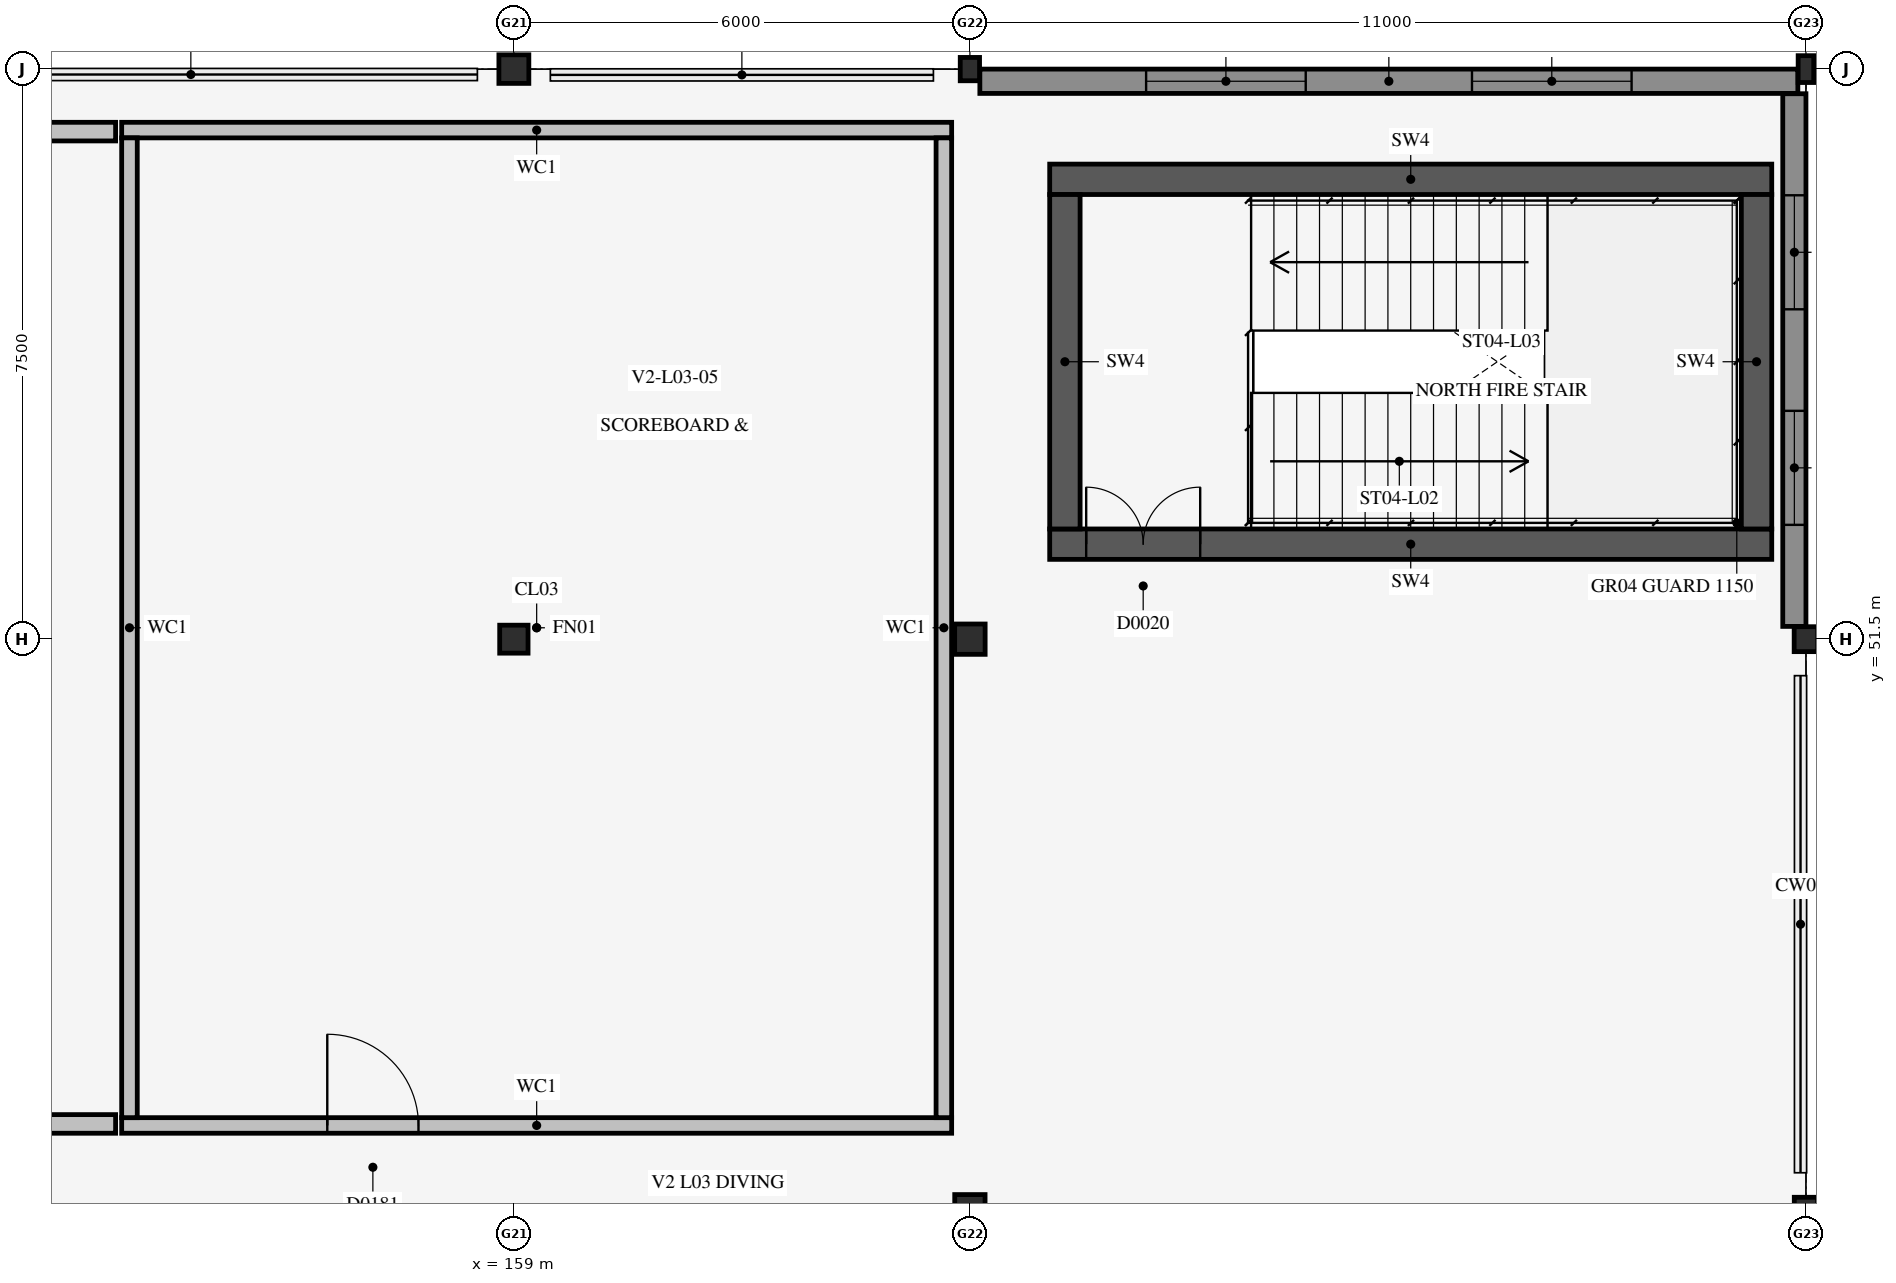
"""IFC4 building model, lengths in metres.
Left out: names, types, materials, properties, quantities, classifications, styles, units other than length and angle.
Written with IfcOpenShell. Run it as: python <this file> out.ifc"""

import sys

from ifc_helpers import new_model, si_unit, direction, frame, frame_2d, origin, origin_2d, place, context, subcontext, project, spatial, rectangle, i_section, extrude, element, fill, save


model = new_model("IFC4")
c1 = context("Model", 3, precision=1e-05, world=origin(), true_north=direction((0.0, 1.0)))
c2 = subcontext(c1, "Body", "Model", "MODEL_VIEW")
j1 = project(units=[si_unit("LENGTHUNIT", "METRE"), si_unit("PLANEANGLEUNIT", "RADIAN")], contexts=[c1])
p1 = place(None, origin())
s1 = spatial("IfcSite", under=j1, at=p1, CompositionType="ELEMENT")
p2 = place(p1, origin())
s2 = spatial("IfcBuilding", under=s1, at=p2, CompositionType="ELEMENT")
p3 = place(p2, frame((0.0, 0.0, 14.8)))
s3 = spatial("IfcBuildingStorey", under=s2, at=p3, CompositionType="ELEMENT", Elevation=14.8)
p4 = place(p3, frame((166.05, 52.75, 0.0), z_axis=(0.0, 0.0, 1.0), x_axis=(1.0, 0.0, 0.0)))
e1 = element("IfcWall", 1, at=p4, inside=s3, PredefinedType="SHEAR", context=c2, shape_type="SweptSolid", body=[
    extrude(rectangle(XDim=9.5, YDim=0.4, at=frame_2d((4.75, 0.0))), origin(), (0.0, 0.0, 1.0), 4.0),
])
p5 = place(p4, frame((0.48, 0.0, 0.0)))
e2 = element("IfcOpeningElement", 2, at=p5, cuts=e1, PredefinedType="OPENING", context=c2, shape_type="SweptSolid", body=[
    extrude(rectangle(XDim=1.5, YDim=2.3, at=frame_2d((0.75, 1.15))), frame((0.0, 0.212, 0.0), z_axis=(0.0, -1.0, 0.0), x_axis=(1.0, 0.0, 0.0)), (0.0, 0.0, 1.0), 0.424),
])
p6 = place(p3, frame((166.05, 57.55, 0.0), z_axis=(0.0, 0.0, 1.0), x_axis=(1.0, 0.0, 0.0)))
e3 = element("IfcWall", 3, at=p6, inside=s3, PredefinedType="SHEAR", context=c2, shape_type="SweptSolid", body=[
    extrude(rectangle(XDim=9.5, YDim=0.4, at=frame_2d((4.75, 0.0))), origin(), (0.0, 0.0, 1.0), 4.0),
])
for number, where, z_axis, x_axis in (
    (4, (166.25, 52.95, 0.0), (0.0, 0.0, 1.0), (0.0, 1.0, 0.0)),
    (5, (175.35, 52.95, 0.0), (0.0, 0.0, 1.0), (0.0, 1.0, 0.0)),
):
    element("IfcWall", number, at=place(p3, frame(where, z_axis=z_axis, x_axis=x_axis)), inside=s3, PredefinedType="SHEAR", context=c2, shape_type="SweptSolid", body=[
        extrude(rectangle(XDim=4.4, YDim=0.4, at=frame_2d((2.2, 0.0))), origin(), (0.0, 0.0, 1.0), 4.0),
    ])
p7 = place(p3, frame((159.0, 51.5, 0.0), z_axis=(0.0, 0.0, 1.0), x_axis=(1.0, 0.0, 0.0)))
e6 = element("IfcColumn", 6, at=p7, inside=s3, PredefinedType="COLUMN", context=c2, shape_type="SweptSolid", body=[
    extrude(i_section(OverallWidth=0.373, OverallDepth=0.368, WebThickness=0.015, FlangeThickness=0.024, FilletRadius=0.014, at=origin_2d()), origin(), (0.0, 0.0, 1.0), 4.82),
])
p8 = place(p3, frame((159.0, 59.0, 0.0), z_axis=(0.0, 0.0, 1.0), x_axis=(1.0, 0.0, 0.0)))
e7 = element("IfcColumn", 7, at=p8, inside=s3, PredefinedType="COLUMN", context=c2, shape_type="SweptSolid", body=[
    extrude(i_section(OverallWidth=0.394, OverallDepth=0.376, WebThickness=0.017, FlangeThickness=0.028, FilletRadius=0.014, at=origin_2d()), origin(), (0.0, 0.0, 1.0), 4.82),
])
p9 = place(p3, frame((165.0, 44.0, 0.0), z_axis=(0.0, 0.0, 1.0), x_axis=(1.0, 0.0, 0.0)))
e8 = element("IfcColumn", 8, at=p9, inside=s3, PredefinedType="COLUMN", context=c2, shape_type="SweptSolid", body=[
    extrude(i_section(OverallWidth=0.399, OverallDepth=0.386, WebThickness=0.021, FlangeThickness=0.033, FilletRadius=0.014, at=origin_2d()), origin(), (0.0, 0.0, 1.0), 4.82),
])
p10 = place(p3, frame((165.0, 51.5, 0.0), z_axis=(0.0, 0.0, 1.0), x_axis=(1.0, 0.0, 0.0)))
e9 = element("IfcColumn", 9, at=p10, inside=s3, PredefinedType="COLUMN", context=c2, shape_type="SweptSolid", body=[
    extrude(i_section(OverallWidth=0.401, OverallDepth=0.399, WebThickness=0.025, FlangeThickness=0.04, FilletRadius=0.014, at=origin_2d()), origin(), (0.0, 0.0, 1.0), 4.82),
])
p11 = place(p3, frame((165.0, 59.0, 0.0), z_axis=(0.0, 0.0, 1.0), x_axis=(1.0, 0.0, 0.0)))
e10 = element("IfcColumn", 10, at=p11, inside=s3, PredefinedType="COLUMN", context=c2, shape_type="SweptSolid", body=[
    extrude(i_section(OverallWidth=0.254, OverallDepth=0.307, WebThickness=0.009, FlangeThickness=0.015, FilletRadius=0.014, at=origin_2d()), origin(), (0.0, 0.0, 1.0), 4.82),
])
p12 = place(p3, frame((176.0, 44.0, 0.0), z_axis=(0.0, 0.0, 1.0), x_axis=(1.0, 0.0, 0.0)))
e11 = element("IfcColumn", 11, at=p12, inside=s3, PredefinedType="COLUMN", context=c2, shape_type="SweptSolid", body=[
    extrude(i_section(OverallWidth=0.307, OverallDepth=0.315, WebThickness=0.012, FlangeThickness=0.019, FilletRadius=0.014, at=origin_2d()), origin(), (0.0, 0.0, 1.0), 4.82),
])
p13 = place(p3, frame((176.0, 51.5, 0.0), z_axis=(0.0, 0.0, 1.0), x_axis=(1.0, 0.0, 0.0)))
e12 = element("IfcColumn", 12, at=p13, inside=s3, PredefinedType="COLUMN", context=c2, shape_type="SweptSolid", body=[
    extrude(i_section(OverallWidth=0.31, OverallDepth=0.328, WebThickness=0.015, FlangeThickness=0.025, FilletRadius=0.014, at=origin_2d()), origin(), (0.0, 0.0, 1.0), 4.82),
])
p14 = place(p3, frame((176.0, 59.0, 0.0), z_axis=(0.0, 0.0, 1.0), x_axis=(1.0, 0.0, 0.0)))
e13 = element("IfcColumn", 13, at=p14, inside=s3, PredefinedType="COLUMN", context=c2, shape_type="SweptSolid", body=[
    extrude(i_section(OverallWidth=0.205, OverallDepth=0.353, WebThickness=0.009, FlangeThickness=0.017, FilletRadius=0.014, at=origin_2d()), origin(), (0.0, 0.0, 1.0), 4.82),
])
p15 = place(p3, frame((142.84, 45.123, 0.0), z_axis=(0.0, 0.0, 1.0), x_axis=(1.0, 0.0, 0.0)))
e14 = element("IfcWall", 14, at=p15, inside=s3, PredefinedType="SOLIDWALL", context=c2, shape_type="SweptSolid", body=[
    extrude(rectangle(XDim=10.92, YDim=0.245, at=frame_2d((5.46, 0.0))), origin(), (0.0, 0.0, 1.0), 3.785),
])
p16 = place(p15, frame((5.522, 0.0, 0.0)))
e15 = element("IfcOpeningElement", 15, at=p16, cuts=e14, PredefinedType="OPENING", context=c2, shape_type="SweptSolid", body=[
    extrude(rectangle(XDim=1.8, YDim=2.35, at=frame_2d((0.9, 1.175))), frame((0.0, 0.135, 0.0), z_axis=(0.0, -1.0, 0.0), x_axis=(1.0, 0.0, 0.0)), (0.0, 0.0, 1.0), 0.269),
])
p17 = place(p3, frame((142.84, 58.177, 0.0), z_axis=(0.0, 0.0, 1.0), x_axis=(1.0, 0.0, 0.0)))
e16 = element("IfcWall", 16, at=p17, inside=s3, PredefinedType="SOLIDWALL", context=c2, shape_type="SweptSolid", body=[
    extrude(rectangle(XDim=10.92, YDim=0.245, at=frame_2d((5.46, 0.0))), origin(), (0.0, 0.0, 1.0), 3.785),
])
p18 = place(p3, frame((153.84, 45.103, 0.0), z_axis=(0.0, 0.0, 1.0), x_axis=(1.0, 0.0, 0.0)))
e17 = element("IfcWall", 17, at=p18, inside=s3, PredefinedType="SOLIDWALL", context=c2, shape_type="SweptSolid", body=[
    extrude(rectangle(XDim=10.92, YDim=0.205, at=frame_2d((5.46, 0.0))), origin(), (0.0, 0.0, 1.0), 3.785),
])
p19 = place(p18, frame((2.705, 0.0, 0.0)))
e18 = element("IfcOpeningElement", 18, at=p19, cuts=e17, PredefinedType="OPENING", context=c2, shape_type="SweptSolid", body=[
    extrude(rectangle(XDim=1.2, YDim=2.2, at=frame_2d((0.6, 1.1))), frame((0.0, 0.115, 0.0), z_axis=(0.0, -1.0, 0.0), x_axis=(1.0, 0.0, 0.0)), (0.0, 0.0, 1.0), 0.229),
])
p20 = place(p3, frame((153.84, 58.198, 0.0), z_axis=(0.0, 0.0, 1.0), x_axis=(1.0, 0.0, 0.0)))
e19 = element("IfcWall", 19, at=p20, inside=s3, PredefinedType="SOLIDWALL", context=c2, shape_type="SweptSolid", body=[
    extrude(rectangle(XDim=10.92, YDim=0.205, at=frame_2d((5.46, 0.0))), origin(), (0.0, 0.0, 1.0), 3.785),
])
for number, where, z_axis, x_axis in (
    (20, (164.657, 45.205, 0.0), (0.0, 0.0, 1.0), (0.0, 1.0, 0.0)),
    (21, (153.942, 45.205, 0.0), (0.0, 0.0, 1.0), (0.0, 1.0, 0.0)),
):
    element("IfcWall", number, at=place(p3, frame(where, z_axis=z_axis, x_axis=x_axis)), inside=s3, PredefinedType="SOLIDWALL", context=c2, shape_type="SweptSolid", body=[
        extrude(rectangle(XDim=12.89, YDim=0.205, at=frame_2d((6.445, 0.0))), origin(), (0.0, 0.0, 1.0), 3.785),
    ])
p21 = place(p3, frame((165.131, 58.84, 0.0), z_axis=(0.0, 0.0, 1.0), x_axis=(1.0, 0.0, 0.0)))
e22 = element("IfcWall", 22, at=p21, inside=s3, PredefinedType="SOLIDWALL", context=c2, shape_type="SweptSolid", body=[
    extrude(rectangle(XDim=10.762, YDim=0.32, at=frame_2d((5.381, 0.0))), origin(), (0.0, 0.0, 1.0), 3.608),
])
p22 = place(p21, frame((2.188, 0.0, 0.95)))
e23 = element("IfcOpeningElement", 23, at=p22, cuts=e22, PredefinedType="OPENING", context=c2, shape_type="SweptSolid", body=[
    extrude(rectangle(XDim=2.1, YDim=1.5, at=frame_2d((1.05, 0.75))), frame((0.0, 0.172, 0.0), z_axis=(0.0, -1.0, 0.0), x_axis=(1.0, 0.0, 0.0)), (0.0, 0.0, 1.0), 0.344),
])
p23 = place(p21, frame((6.475, 0.0, 0.95)))
e24 = element("IfcOpeningElement", 24, at=p23, cuts=e22, PredefinedType="OPENING", context=c2, shape_type="SweptSolid", body=[
    extrude(rectangle(XDim=2.1, YDim=1.5, at=frame_2d((1.05, 0.75))), frame((0.0, 0.172, 0.0), z_axis=(0.0, -1.0, 0.0), x_axis=(1.0, 0.0, 0.0)), (0.0, 0.0, 1.0), 0.344),
])
p24 = place(p3, frame((175.847, 51.668, 0.0), z_axis=(0.0, 0.0, 1.0), x_axis=(0.0, 1.0, 0.0)))
e25 = element("IfcWall", 25, at=p24, inside=s3, PredefinedType="SOLIDWALL", context=c2, shape_type="SweptSolid", body=[
    extrude(rectangle(XDim=7.008, YDim=0.305, at=frame_2d((3.504, 0.0))), origin(), (0.0, 0.0, 1.0), 4.05),
])
p25 = place(p24, frame((1.336, 0.0, 0.95)))
e26 = element("IfcOpeningElement", 26, at=p25, cuts=e25, PredefinedType="OPENING", context=c2, shape_type="SweptSolid", body=[
    extrude(rectangle(XDim=1.5, YDim=1.2, at=frame_2d((0.75, 0.6))), frame((0.0, 0.165, 0.0), z_axis=(0.0, -1.0, 0.0), x_axis=(1.0, 0.0, 0.0)), (0.0, 0.0, 1.0), 0.329),
])
p26 = place(p24, frame((4.172, 0.0, 0.95)))
e27 = element("IfcOpeningElement", 27, at=p26, cuts=e25, PredefinedType="OPENING", context=c2, shape_type="SweptSolid", body=[
    extrude(rectangle(XDim=1.5, YDim=1.2, at=frame_2d((0.75, 0.6))), frame((0.0, 0.165, 0.0), z_axis=(0.0, -1.0, 0.0), x_axis=(1.0, 0.0, 0.0)), (0.0, 0.0, 1.0), 0.329),
])
p27 = place(p5, origin())
e28 = element("IfcDoor", 28, at=p27, inside=s3, OperationType="DOUBLE_DOOR_SINGLE_SWING", PredefinedType="DOOR", context=c2, shape_type="SweptSolid", body=[
    extrude(rectangle(XDim=1.5, YDim=2.3, at=frame_2d((0.75, 1.15))), frame((0.0, 0.025, 0.0), z_axis=(0.0, -1.0, 0.0), x_axis=(1.0, 0.0, 0.0)), (0.0, 0.0, 1.0), 0.05),
])
fill(e2, e28)
p28 = place(p19, origin())
e29 = element("IfcDoor", 29, at=p28, inside=s3, OperationType="SINGLE_SWING_LEFT", PredefinedType="DOOR", context=c2, shape_type="SweptSolid", body=[
    extrude(rectangle(XDim=1.2, YDim=2.2, at=frame_2d((0.6, 1.1))), frame((0.0, 0.025, 0.0), z_axis=(0.0, -1.0, 0.0), x_axis=(1.0, 0.0, 0.0)), (0.0, 0.0, 1.0), 0.05),
])
fill(e18, e29)
p29 = place(p22, origin())
e30 = element("IfcWindow", 30, at=p29, inside=s3, PartitioningType="SINGLE_PANEL", PredefinedType="WINDOW", context=c2, shape_type="SweptSolid", body=[
    extrude(rectangle(XDim=2.1, YDim=1.5, at=frame_2d((1.05, 0.75))), frame((0.0, 0.03, 0.0), z_axis=(0.0, -1.0, 0.0), x_axis=(1.0, 0.0, 0.0)), (0.0, 0.0, 1.0), 0.06),
])
fill(e23, e30)
p30 = place(p23, origin())
e31 = element("IfcWindow", 31, at=p30, inside=s3, PartitioningType="SINGLE_PANEL", PredefinedType="WINDOW", context=c2, shape_type="SweptSolid", body=[
    extrude(rectangle(XDim=2.1, YDim=1.5, at=frame_2d((1.05, 0.75))), frame((0.0, 0.03, 0.0), z_axis=(0.0, -1.0, 0.0), x_axis=(1.0, 0.0, 0.0)), (0.0, 0.0, 1.0), 0.06),
])
fill(e24, e31)
p31 = place(p25, origin())
e32 = element("IfcWindow", 32, at=p31, inside=s3, PartitioningType="SINGLE_PANEL", PredefinedType="WINDOW", context=c2, shape_type="SweptSolid", body=[
    extrude(rectangle(XDim=1.5, YDim=1.2, at=frame_2d((0.75, 0.6))), frame((0.0, 0.03, 0.0), z_axis=(0.0, -1.0, 0.0), x_axis=(1.0, 0.0, 0.0)), (0.0, 0.0, 1.0), 0.06),
])
fill(e26, e32)
p32 = place(p26, origin())
e33 = element("IfcWindow", 33, at=p32, inside=s3, PartitioningType="SINGLE_PANEL", PredefinedType="WINDOW", context=c2, shape_type="SweptSolid", body=[
    extrude(rectangle(XDim=1.5, YDim=1.2, at=frame_2d((0.75, 0.6))), frame((0.0, 0.03, 0.0), z_axis=(0.0, -1.0, 0.0), x_axis=(1.0, 0.0, 0.0)), (0.0, 0.0, 1.0), 0.06),
])
fill(e27, e33)
save(model, sys.argv[1])
